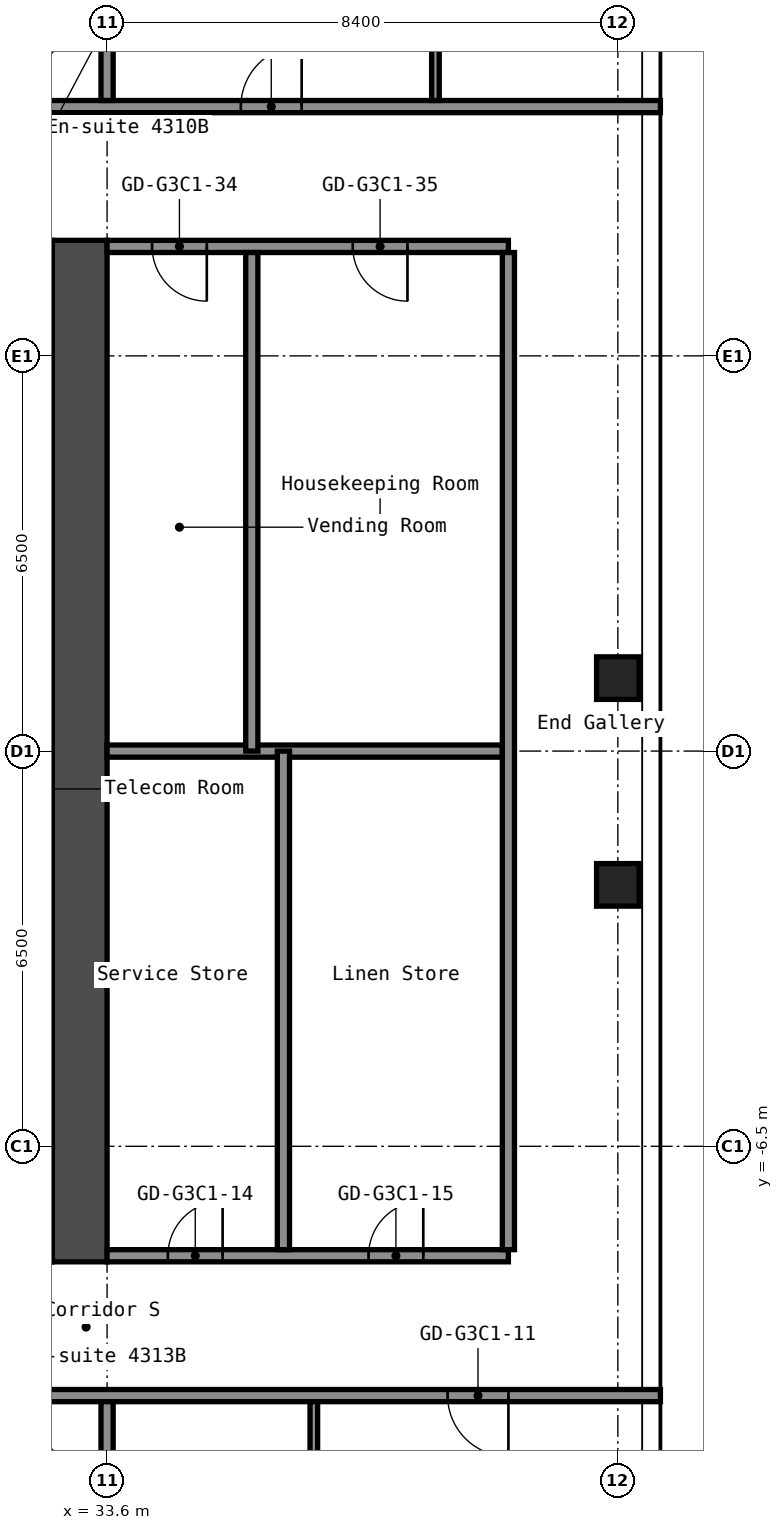
"""IFC4 building model, lengths in metres.
Left out: names, types, materials, properties, quantities, classifications, styles, units other than length and angle.
Written with IfcOpenShell. Run it as: python <this file> out.ifc"""

import sys

from ifc_helpers import new_model, si_unit, direction, frame, frame_2d, origin, origin_2d, place, context, subcontext, project, spatial, rectangle, hollow_rectangle, extrude, element, fill, save


model = new_model("IFC4")
c1 = context("Model", 3, precision=1e-05, world=origin(), true_north=direction((0.0, 1.0)))
c2 = subcontext(c1, "Body", "Model", "MODEL_VIEW")
j1 = project(units=[si_unit("LENGTHUNIT", "METRE"), si_unit("PLANEANGLEUNIT", "RADIAN")], contexts=[c1])
p1 = place(None, origin())
s1 = spatial("IfcSite", under=j1, at=p1, CompositionType="ELEMENT")
p2 = place(p1, origin())
s2 = spatial("IfcBuilding", under=s1, at=p2, CompositionType="ELEMENT")
p3 = place(p2, frame((0.0, 0.0, 153.4)))
s3 = spatial("IfcBuildingStorey", under=s2, at=p3, CompositionType="ELEMENT", Elevation=153.4)
for number, where, z_axis, x_axis in (
    (1, (42.0, -2.2, 0.0), (0.0, 0.0, 1.0), (1.0, 0.0, 0.0)),
    (2, (42.0, 1.2, 0.0), (0.0, 0.0, 1.0), (1.0, 0.0, 0.0)),
):
    element("IfcColumn", number, at=place(p3, frame(where, z_axis=z_axis, x_axis=x_axis)), inside=s3, PredefinedType="COLUMN", context=c2, shape_type="SweptSolid", body=[
        extrude(hollow_rectangle(XDim=0.7, YDim=0.7, WallThickness=0.028, at=origin_2d()), origin(), (0.0, 0.0, 1.0), 2.75),
    ])
p4 = place(p3, frame((33.15, -8.4, 0.0), z_axis=(0.0, 0.0, 1.0), x_axis=(0.0, 1.0, 0.0)))
e3 = element("IfcWall", 3, at=p4, inside=s3, PredefinedType="SHEAR", context=c2, shape_type="SweptSolid", body=[
    extrude(rectangle(XDim=16.8, YDim=0.9, at=frame_2d((8.4, 0.0))), origin(), (0.0, 0.0, 1.0), 2.75),
])
p5 = place(p3, frame((16.8, -10.6, 0.0), z_axis=(0.0, 0.0, 1.0), x_axis=(1.0, 0.0, 0.0)))
e4 = element("IfcWall", 4, at=p5, inside=s3, PredefinedType="PARTITIONING", context=c2, shape_type="SweptSolid", body=[
    extrude(rectangle(XDim=25.9, YDim=0.2, at=frame_2d((12.95, 0.0))), origin(), (0.0, 0.0, 1.0), 2.75),
])
p6 = place(p5, frame((2.0, 0.0, 0.0)))
e5 = element("IfcOpeningElement", 5, at=p6, cuts=e4, PredefinedType="OPENING", context=c2, shape_type="SweptSolid", body=[
    extrude(rectangle(XDim=1.0, YDim=2.1, at=frame_2d((0.5, 1.05))), frame((0.0, 0.11, 0.0), z_axis=(0.0, -1.0, 0.0), x_axis=(1.0, 0.0, 0.0)), (0.0, 0.0, 1.0), 0.22),
])
p7 = place(p5, frame((11.25, 0.0, 0.0)))
e6 = element("IfcOpeningElement", 6, at=p7, cuts=e4, PredefinedType="OPENING", context=c2, shape_type="SweptSolid", body=[
    extrude(rectangle(XDim=1.0, YDim=2.1, at=frame_2d((0.5, 1.05))), frame((0.0, 0.11, 0.0), z_axis=(0.0, -1.0, 0.0), x_axis=(1.0, 0.0, 0.0)), (0.0, 0.0, 1.0), 0.22),
])
p8 = place(p5, frame((12.95, 0.0, 0.0)))
e7 = element("IfcOpeningElement", 7, at=p8, cuts=e4, PredefinedType="OPENING", context=c2, shape_type="SweptSolid", body=[
    extrude(rectangle(XDim=1.0, YDim=2.1, at=frame_2d((0.5, 1.05))), frame((0.0, 0.11, 0.0), z_axis=(0.0, -1.0, 0.0), x_axis=(1.0, 0.0, 0.0)), (0.0, 0.0, 1.0), 0.22),
])
p9 = place(p5, frame((22.4, 0.0, 0.0)))
e8 = element("IfcOpeningElement", 8, at=p9, cuts=e4, PredefinedType="OPENING", context=c2, shape_type="SweptSolid", body=[
    extrude(rectangle(XDim=1.0, YDim=2.1, at=frame_2d((0.5, 1.05))), frame((0.0, 0.11, 0.0), z_axis=(0.0, -1.0, 0.0), x_axis=(1.0, 0.0, 0.0)), (0.0, 0.0, 1.0), 0.22),
])
p10 = place(p3, frame((33.6, -8.3, 0.0), z_axis=(0.0, 0.0, 1.0), x_axis=(1.0, 0.0, 0.0)))
e9 = element("IfcWall", 9, at=p10, inside=s3, PredefinedType="PARTITIONING", context=c2, shape_type="SweptSolid", body=[
    extrude(rectangle(XDim=6.6, YDim=0.2, at=frame_2d((3.3, 0.0))), origin(), (0.0, 0.0, 1.0), 2.75),
])
p11 = place(p10, frame((1.0, 0.0, 0.0)))
e10 = element("IfcOpeningElement", 10, at=p11, cuts=e9, PredefinedType="OPENING", context=c2, shape_type="SweptSolid", body=[
    extrude(rectangle(XDim=0.9, YDim=2.1, at=frame_2d((0.45, 1.05))), frame((0.0, 0.11, 0.0), z_axis=(0.0, -1.0, 0.0), x_axis=(1.0, 0.0, 0.0)), (0.0, 0.0, 1.0), 0.22),
])
p12 = place(p10, frame((4.3, 0.0, 0.0)))
e11 = element("IfcOpeningElement", 11, at=p12, cuts=e9, PredefinedType="OPENING", context=c2, shape_type="SweptSolid", body=[
    extrude(rectangle(XDim=0.9, YDim=2.1, at=frame_2d((0.45, 1.05))), frame((0.0, 0.11, 0.0), z_axis=(0.0, -1.0, 0.0), x_axis=(1.0, 0.0, 0.0)), (0.0, 0.0, 1.0), 0.22),
])
p13 = place(p3, frame((33.6, 0.0, 0.0), z_axis=(0.0, 0.0, 1.0), x_axis=(1.0, 0.0, 0.0)))
e12 = element("IfcWall", 12, at=p13, inside=s3, PredefinedType="PARTITIONING", context=c2, shape_type="SweptSolid", body=[
    extrude(rectangle(XDim=6.5, YDim=0.2, at=frame_2d((3.25, 0.0))), origin(), (0.0, 0.0, 1.0), 2.75),
])
p14 = place(p3, frame((33.6, 8.3, 0.0), z_axis=(0.0, 0.0, 1.0), x_axis=(1.0, 0.0, 0.0)))
e13 = element("IfcWall", 13, at=p14, inside=s3, PredefinedType="PARTITIONING", context=c2, shape_type="SweptSolid", body=[
    extrude(rectangle(XDim=6.6, YDim=0.2, at=frame_2d((3.3, 0.0))), origin(), (0.0, 0.0, 1.0), 2.75),
])
p15 = place(p14, frame((0.74, 0.0, 0.0)))
e14 = element("IfcOpeningElement", 14, at=p15, cuts=e13, PredefinedType="OPENING", context=c2, shape_type="SweptSolid", body=[
    extrude(rectangle(XDim=0.9, YDim=2.1, at=frame_2d((0.45, 1.05))), frame((0.0, 0.11, 0.0), z_axis=(0.0, -1.0, 0.0), x_axis=(1.0, 0.0, 0.0)), (0.0, 0.0, 1.0), 0.22),
])
p16 = place(p14, frame((4.04, 0.0, 0.0)))
e15 = element("IfcOpeningElement", 15, at=p16, cuts=e13, PredefinedType="OPENING", context=c2, shape_type="SweptSolid", body=[
    extrude(rectangle(XDim=0.9, YDim=2.1, at=frame_2d((0.45, 1.05))), frame((0.0, 0.11, 0.0), z_axis=(0.0, -1.0, 0.0), x_axis=(1.0, 0.0, 0.0)), (0.0, 0.0, 1.0), 0.22),
])
p17 = place(p3, frame((16.8, 10.6, 0.0), z_axis=(0.0, 0.0, 1.0), x_axis=(1.0, 0.0, 0.0)))
e16 = element("IfcWall", 16, at=p17, inside=s3, PredefinedType="PARTITIONING", context=c2, shape_type="SweptSolid", body=[
    extrude(rectangle(XDim=25.9, YDim=0.2, at=frame_2d((12.95, 0.0))), origin(), (0.0, 0.0, 1.0), 2.75),
])
p18 = place(p17, frame((2.0, 0.0, 0.0)))
e17 = element("IfcOpeningElement", 17, at=p18, cuts=e16, PredefinedType="OPENING", context=c2, shape_type="SweptSolid", body=[
    extrude(rectangle(XDim=1.0, YDim=2.1, at=frame_2d((0.5, 1.05))), frame((0.0, 0.11, 0.0), z_axis=(0.0, -1.0, 0.0), x_axis=(1.0, 0.0, 0.0)), (0.0, 0.0, 1.0), 0.22),
])
p19 = place(p17, frame((11.25, 0.0, 0.0)))
e18 = element("IfcOpeningElement", 18, at=p19, cuts=e16, PredefinedType="OPENING", context=c2, shape_type="SweptSolid", body=[
    extrude(rectangle(XDim=1.0, YDim=2.1, at=frame_2d((0.5, 1.05))), frame((0.0, 0.11, 0.0), z_axis=(0.0, -1.0, 0.0), x_axis=(1.0, 0.0, 0.0)), (0.0, 0.0, 1.0), 0.22),
])
p20 = place(p17, frame((12.95, 0.0, 0.0)))
e19 = element("IfcOpeningElement", 19, at=p20, cuts=e16, PredefinedType="OPENING", context=c2, shape_type="SweptSolid", body=[
    extrude(rectangle(XDim=1.0, YDim=2.1, at=frame_2d((0.5, 1.05))), frame((0.0, 0.11, 0.0), z_axis=(0.0, -1.0, 0.0), x_axis=(1.0, 0.0, 0.0)), (0.0, 0.0, 1.0), 0.22),
])
p21 = place(p17, frame((19.0, 0.0, 0.0)))
e20 = element("IfcOpeningElement", 20, at=p21, cuts=e16, PredefinedType="OPENING", context=c2, shape_type="SweptSolid", body=[
    extrude(rectangle(XDim=1.0, YDim=2.1, at=frame_2d((0.5, 1.05))), frame((0.0, 0.11, 0.0), z_axis=(0.0, -1.0, 0.0), x_axis=(1.0, 0.0, 0.0)), (0.0, 0.0, 1.0), 0.22),
])
p22 = place(p3, frame((33.6, -19.3, 0.0), z_axis=(0.0, 0.0, 1.0), x_axis=(0.0, 1.0, 0.0)))
e21 = element("IfcWall", 21, at=p22, inside=s3, PredefinedType="PARTITIONING", context=c2, shape_type="SweptSolid", body=[
    extrude(rectangle(XDim=8.6, YDim=0.2, at=frame_2d((4.3, 0.0))), origin(), (0.0, 0.0, 1.0), 2.75),
])
p23 = place(p3, frame((33.6, 10.7, 0.0), z_axis=(0.0, 0.0, 1.0), x_axis=(0.0, 1.0, 0.0)))
e22 = element("IfcWall", 22, at=p23, inside=s3, PredefinedType="PARTITIONING", context=c2, shape_type="SweptSolid", body=[
    extrude(rectangle(XDim=7.6, YDim=0.2, at=frame_2d((3.8, 0.0))), origin(), (0.0, 0.0, 1.0), 2.75),
])
for number, where, z_axis, x_axis in (
    (23, (35.98, 0.0, 0.0), (0.0, 0.0, 1.0), (0.0, 1.0, 0.0)),
    (24, (36.5, -8.2, 0.0), (0.0, 0.0, 1.0), (0.0, 1.0, 0.0)),
):
    element("IfcWall", number, at=place(p3, frame(where, z_axis=z_axis, x_axis=x_axis)), inside=s3, PredefinedType="PARTITIONING", context=c2, shape_type="SweptSolid", body=[
        extrude(rectangle(XDim=8.2, YDim=0.2, at=frame_2d((4.1, 0.0))), origin(), (0.0, 0.0, 1.0), 2.75),
    ])
for number, where, z_axis, x_axis in (
    (25, (37.0, -14.0, 0.0), (0.0, 0.0, 1.0), (0.0, 1.0, 0.0)),
    (26, (39.0, 10.7, 0.0), (0.0, 0.0, 1.0), (0.0, 1.0, 0.0)),
):
    element("IfcWall", number, at=place(p3, frame(where, z_axis=z_axis, x_axis=x_axis)), inside=s3, PredefinedType="PARTITIONING", context=c2, shape_type="SweptSolid", body=[
        extrude(rectangle(XDim=3.3, YDim=0.125, at=frame_2d((1.65, 0.0))), origin(), (0.0, 0.0, 1.0), 2.75),
    ])
p24 = place(p3, frame((40.2, -8.2, 0.0), z_axis=(0.0, 0.0, 1.0), x_axis=(0.0, 1.0, 0.0)))
e27 = element("IfcWall", 27, at=p24, inside=s3, PredefinedType="PARTITIONING", context=c2, shape_type="SweptSolid", body=[
    extrude(rectangle(XDim=16.4, YDim=0.2, at=frame_2d((8.2, 0.0))), origin(), (0.0, 0.0, 1.0), 2.75),
])
p25 = place(p9, origin())
e28 = element("IfcDoor", 28, at=p25, inside=s3, OperationType="SINGLE_SWING_RIGHT", PredefinedType="DOOR", context=c2, shape_type="SweptSolid", body=[
    extrude(rectangle(XDim=1.0, YDim=2.1, at=frame_2d((0.5, 1.05))), frame((0.0, 0.025, 0.0), z_axis=(0.0, -1.0, 0.0), x_axis=(1.0, 0.0, 0.0)), (0.0, 0.0, 1.0), 0.05),
])
fill(e8, e28)
p26 = place(p11, origin())
e29 = element("IfcDoor", 29, at=p26, inside=s3, OperationType="SINGLE_SWING_LEFT", PredefinedType="DOOR", context=c2, shape_type="SweptSolid", body=[
    extrude(rectangle(XDim=0.9, YDim=2.1, at=frame_2d((0.45, 1.05))), frame((0.0, 0.025, 0.0), z_axis=(0.0, -1.0, 0.0), x_axis=(1.0, 0.0, 0.0)), (0.0, 0.0, 1.0), 0.05),
])
fill(e10, e29)
p27 = place(p12, origin())
e30 = element("IfcDoor", 30, at=p27, inside=s3, OperationType="SINGLE_SWING_LEFT", PredefinedType="DOOR", context=c2, shape_type="SweptSolid", body=[
    extrude(rectangle(XDim=0.9, YDim=2.1, at=frame_2d((0.45, 1.05))), frame((0.0, 0.025, 0.0), z_axis=(0.0, -1.0, 0.0), x_axis=(1.0, 0.0, 0.0)), (0.0, 0.0, 1.0), 0.05),
])
fill(e11, e30)
p28 = place(p15, origin())
e31 = element("IfcDoor", 31, at=p28, inside=s3, OperationType="SINGLE_SWING_RIGHT", PredefinedType="DOOR", context=c2, shape_type="SweptSolid", body=[
    extrude(rectangle(XDim=0.9, YDim=2.1, at=frame_2d((0.45, 1.05))), frame((0.0, 0.025, 0.0), z_axis=(0.0, -1.0, 0.0), x_axis=(1.0, 0.0, 0.0)), (0.0, 0.0, 1.0), 0.05),
])
fill(e14, e31)
p29 = place(p16, origin())
e32 = element("IfcDoor", 32, at=p29, inside=s3, OperationType="SINGLE_SWING_RIGHT", PredefinedType="DOOR", context=c2, shape_type="SweptSolid", body=[
    extrude(rectangle(XDim=0.9, YDim=2.1, at=frame_2d((0.45, 1.05))), frame((0.0, 0.025, 0.0), z_axis=(0.0, -1.0, 0.0), x_axis=(1.0, 0.0, 0.0)), (0.0, 0.0, 1.0), 0.05),
])
fill(e15, e32)
p30 = place(p21, origin())
e33 = element("IfcDoor", 33, at=p30, inside=s3, OperationType="SINGLE_SWING_LEFT", PredefinedType="DOOR", context=c2, shape_type="SweptSolid", body=[
    extrude(rectangle(XDim=1.0, YDim=2.1, at=frame_2d((0.5, 1.05))), frame((0.0, 0.025, 0.0), z_axis=(0.0, -1.0, 0.0), x_axis=(1.0, 0.0, 0.0)), (0.0, 0.0, 1.0), 0.05),
])
fill(e20, e33)
save(model, sys.argv[1])
